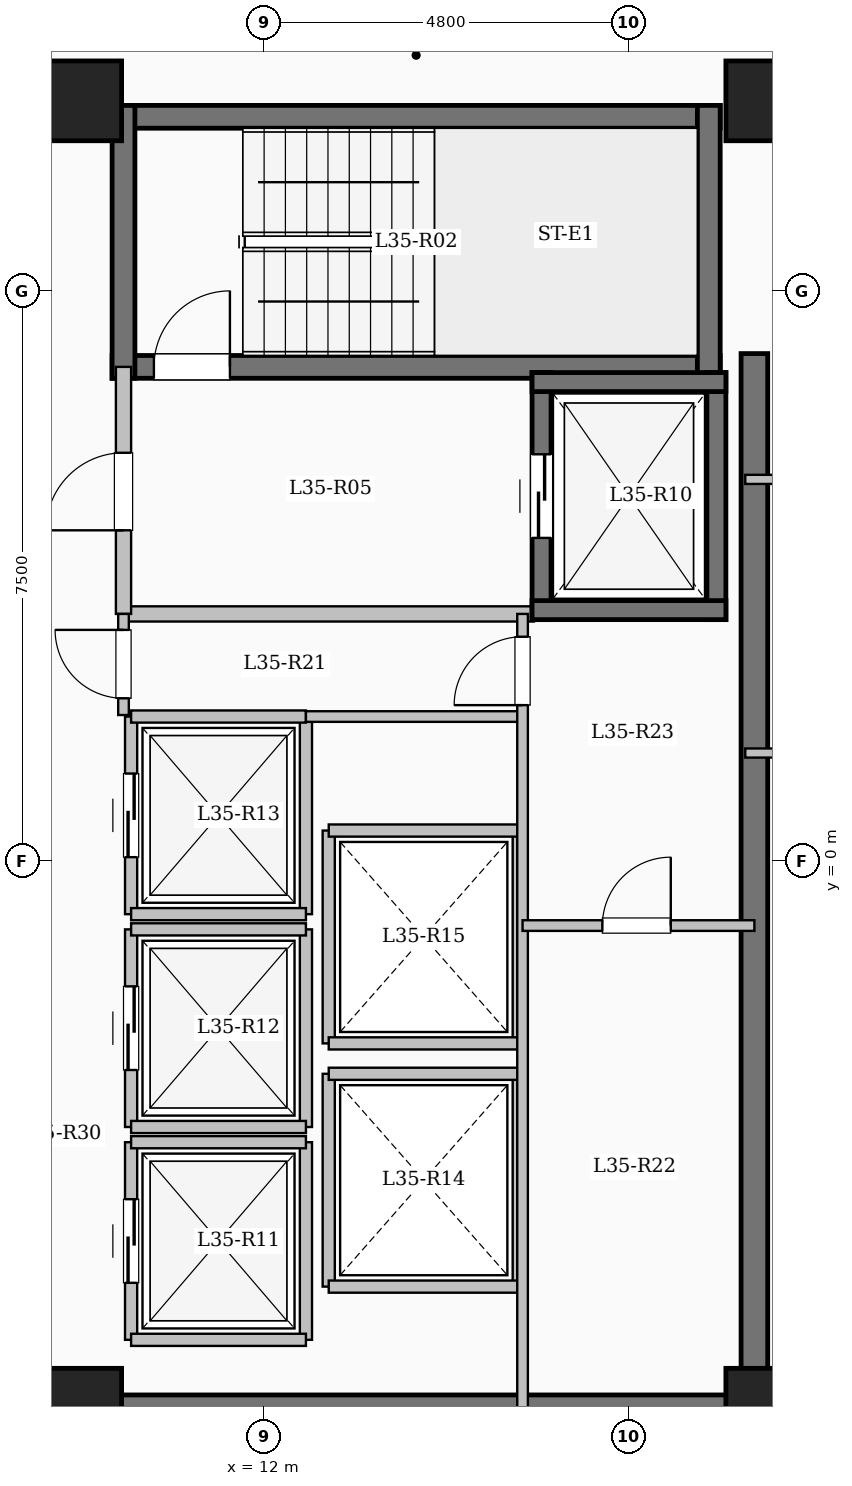
"""IFC4 building model, lengths in metres.
Left out: names, types, materials, properties, quantities, classifications, styles, units other than length and angle.
Written with IfcOpenShell. Run it as: python <this file> out.ifc"""

import sys

from ifc_helpers import new_model, si_unit, direction, frame, frame_2d, origin, origin_2d, place, context, subcontext, project, spatial, rectangle, extrude, element, fill, save


model = new_model("IFC4")
c1 = context("Model", 3, precision=1e-05, world=origin(), true_north=direction((0.0, 1.0)))
c2 = subcontext(c1, "Body", "Model", "MODEL_VIEW")
j1 = project(units=[si_unit("LENGTHUNIT", "METRE"), si_unit("PLANEANGLEUNIT", "RADIAN")], contexts=[c1])
p1 = place(None, origin())
s1 = spatial("IfcSite", under=j1, at=p1, CompositionType="ELEMENT")
p2 = place(p1, origin())
s2 = spatial("IfcBuilding", under=s1, at=p2, CompositionType="ELEMENT")
p3 = place(p2, frame((0.0, 0.0, 132.6)))
s3 = spatial("IfcBuildingStorey", under=s2, at=p3, CompositionType="ELEMENT", Elevation=132.6)
for number, where, z_axis, x_axis in (
    (1, (9.6, -7.2, 0.0), (0.0, 0.0, 1.0), (1.0, 0.0, 0.0)),
    (2, (9.6, 10.0, 0.0), (0.0, 0.0, 1.0), (1.0, 0.0, 0.0)),
    (3, (18.6, -7.2, 0.0), (0.0, 0.0, 1.0), (1.0, 0.0, 0.0)),
    (4, (18.6, 10.0, 0.0), (0.0, 0.0, 1.0), (1.0, 0.0, 0.0)),
):
    element("IfcColumn", number, at=place(p3, frame(where, z_axis=z_axis, x_axis=x_axis)), inside=s3, PredefinedType="COLUMN", context=c2, shape_type="SweptSolid", body=[
        extrude(rectangle(XDim=1.05, YDim=1.05, at=origin_2d()), origin(), (0.0, 0.0, 1.0), 3.35),
    ])
p4 = place(p3, frame((10.0, 9.79, 0.0), z_axis=(0.0, 0.0, 1.0), x_axis=(1.0, 0.0, 0.0)))
e5 = element("IfcWall", 5, at=p4, inside=s3, PredefinedType="SHEAR", context=c2, shape_type="SweptSolid", body=[
    extrude(rectangle(XDim=8.0, YDim=0.3, at=frame_2d((4.0, 0.0))), origin(), (0.0, 0.0, 1.0), 3.35),
])
p5 = place(p3, frame((10.0, 6.5, 0.0), z_axis=(0.0, 0.0, 1.0), x_axis=(1.0, 0.0, 0.0)))
e6 = element("IfcWall", 6, at=p5, inside=s3, PredefinedType="SHEAR", context=c2, shape_type="SweptSolid", body=[
    extrude(rectangle(XDim=8.0, YDim=0.3, at=frame_2d((4.0, 0.0))), origin(), (0.0, 0.0, 1.0), 3.35),
])
p6 = place(p5, frame((0.55, 0.0, 0.0)))
e7 = element("IfcOpeningElement", 7, at=p6, cuts=e6, PredefinedType="OPENING", context=c2, shape_type="SweptSolid", body=[
    extrude(rectangle(XDim=1.0, YDim=2.15, at=frame_2d((0.5, 1.075))), frame((0.0, 0.16, 0.0), z_axis=(0.0, -1.0, 0.0), x_axis=(1.0, 0.0, 0.0)), (0.0, 0.0, 1.0), 0.32),
])
for number, where, z_axis, x_axis in (
    (8, (10.15, 6.35, 0.0), (0.0, 0.0, 1.0), (0.0, 1.0, 0.0)),
    (9, (17.85, 6.35, 0.0), (0.0, 0.0, 1.0), (0.0, 1.0, 0.0)),
):
    element("IfcWall", number, at=place(p3, frame(where, z_axis=z_axis, x_axis=x_axis)), inside=s3, PredefinedType="SHEAR", context=c2, shape_type="SweptSolid", body=[
        extrude(rectangle(XDim=3.59, YDim=0.3, at=frame_2d((1.795, 0.0))), origin(), (0.0, 0.0, 1.0), 3.35),
    ])
p7 = place(p3, frame((10.15, 3.25, 0.0), z_axis=(0.0, 0.0, 1.0), x_axis=(1.0, 0.0, 0.0)))
e10 = element("IfcWall", 10, at=p7, inside=s3, PredefinedType="SOLIDWALL", context=c2, shape_type="SweptSolid", body=[
    extrude(rectangle(XDim=5.4, YDim=0.2, at=frame_2d((2.7, 0.0))), origin(), (0.0, 0.0, 1.0), 3.1),
])
p8 = place(p3, frame((10.15, 3.25, 0.0), z_axis=(0.0, 0.0, 1.0), x_axis=(0.0, 1.0, 0.0)))
e11 = element("IfcWall", 11, at=p8, inside=s3, PredefinedType="SOLIDWALL", context=c2, shape_type="SweptSolid", body=[
    extrude(rectangle(XDim=3.25, YDim=0.2, at=frame_2d((1.625, 0.0))), origin(), (0.0, 0.0, 1.0), 3.1),
])
p9 = place(p8, frame((1.1, 0.0, 0.0)))
e12 = element("IfcOpeningElement", 12, at=p9, cuts=e11, PredefinedType="OPENING", context=c2, shape_type="SweptSolid", body=[
    extrude(rectangle(XDim=1.02, YDim=2.15, at=frame_2d((0.51, 1.075))), frame((0.0, 0.11, 0.0), z_axis=(0.0, -1.0, 0.0), x_axis=(1.0, 0.0, 0.0)), (0.0, 0.0, 1.0), 0.22),
])
p10 = place(p3, frame((15.65, 3.175, 0.0), z_axis=(0.0, 0.0, 1.0), x_axis=(0.0, 1.0, 0.0)))
e13 = element("IfcWall", 13, at=p10, inside=s3, PredefinedType="SHEAR", context=c2, shape_type="SweptSolid", body=[
    extrude(rectangle(XDim=3.25, YDim=0.25, at=frame_2d((1.625, 0.0))), origin(), (0.0, 0.0, 1.0), 3.35),
])
p11 = place(p10, frame((1.075, 0.0, 0.0)))
e14 = element("IfcOpeningElement", 14, at=p11, cuts=e13, PredefinedType="OPENING", context=c2, shape_type="SweptSolid", body=[
    extrude(rectangle(XDim=1.1, YDim=2.15, at=frame_2d((0.55, 1.075))), frame((0.0, 0.135, 0.0), z_axis=(0.0, -1.0, 0.0), x_axis=(1.0, 0.0, 0.0)), (0.0, 0.0, 1.0), 0.27),
])
p12 = place(p3, frame((17.95, 3.175, 0.0), z_axis=(0.0, 0.0, 1.0), x_axis=(0.0, 1.0, 0.0)))
e15 = element("IfcWall", 15, at=p12, inside=s3, PredefinedType="SHEAR", context=c2, shape_type="SweptSolid", body=[
    extrude(rectangle(XDim=3.25, YDim=0.25, at=frame_2d((1.625, 0.0))), origin(), (0.0, 0.0, 1.0), 3.35),
])
for number, where, z_axis, x_axis in (
    (16, (15.525, 3.3, 0.0), (0.0, 0.0, 1.0), (1.0, 0.0, 0.0)),
    (17, (15.525, 6.3, 0.0), (0.0, 0.0, 1.0), (1.0, 0.0, 0.0)),
):
    element("IfcWall", number, at=place(p3, frame(where, z_axis=z_axis, x_axis=x_axis)), inside=s3, PredefinedType="SHEAR", context=c2, shape_type="SweptSolid", body=[
        extrude(rectangle(XDim=2.55, YDim=0.25, at=frame_2d((1.275, 0.0))), origin(), (0.0, 0.0, 1.0), 3.35),
    ])
p13 = place(p3, frame((10.25, -6.3, 0.0), z_axis=(0.0, 0.0, 1.0), x_axis=(0.0, 1.0, 0.0)))
e18 = element("IfcWall", 18, at=p13, inside=s3, PredefinedType="SOLIDWALL", context=c2, shape_type="SweptSolid", body=[
    extrude(rectangle(XDim=2.6, YDim=0.16, at=frame_2d((1.3, 0.0))), origin(), (0.0, 0.0, 1.0), 3.1),
])
p14 = place(p13, frame((0.75, 0.0, 0.0)))
e19 = element("IfcOpeningElement", 19, at=p14, cuts=e18, PredefinedType="OPENING", context=c2, shape_type="SweptSolid", body=[
    extrude(rectangle(XDim=1.1, YDim=2.15, at=frame_2d((0.55, 1.075))), frame((0.0, 0.09, 0.0), z_axis=(0.0, -1.0, 0.0), x_axis=(1.0, 0.0, 0.0)), (0.0, 0.0, 1.0), 0.18),
])
p15 = place(p3, frame((12.55, -6.3, 0.0), z_axis=(0.0, 0.0, 1.0), x_axis=(0.0, 1.0, 0.0)))
e20 = element("IfcWall", 20, at=p15, inside=s3, PredefinedType="SOLIDWALL", context=c2, shape_type="SweptSolid", body=[
    extrude(rectangle(XDim=2.6, YDim=0.16, at=frame_2d((1.3, 0.0))), origin(), (0.0, 0.0, 1.0), 3.1),
])
for number, where, z_axis, x_axis in (
    (21, (10.25, -6.3, 0.0), (0.0, 0.0, 1.0), (1.0, 0.0, 0.0)),
    (22, (10.25, -3.7, 0.0), (0.0, 0.0, 1.0), (1.0, 0.0, 0.0)),
):
    element("IfcWall", number, at=place(p3, frame(where, z_axis=z_axis, x_axis=x_axis)), inside=s3, PredefinedType="SOLIDWALL", context=c2, shape_type="SweptSolid", body=[
        extrude(rectangle(XDim=2.3, YDim=0.16, at=frame_2d((1.15, 0.0))), origin(), (0.0, 0.0, 1.0), 3.1),
    ])
p16 = place(p3, frame((10.25, -3.5, 0.0), z_axis=(0.0, 0.0, 1.0), x_axis=(0.0, 1.0, 0.0)))
e23 = element("IfcWall", 23, at=p16, inside=s3, PredefinedType="SOLIDWALL", context=c2, shape_type="SweptSolid", body=[
    extrude(rectangle(XDim=2.6, YDim=0.16, at=frame_2d((1.3, 0.0))), origin(), (0.0, 0.0, 1.0), 3.1),
])
p17 = place(p16, frame((0.75, 0.0, 0.0)))
e24 = element("IfcOpeningElement", 24, at=p17, cuts=e23, PredefinedType="OPENING", context=c2, shape_type="SweptSolid", body=[
    extrude(rectangle(XDim=1.1, YDim=2.15, at=frame_2d((0.55, 1.075))), frame((0.0, 0.09, 0.0), z_axis=(0.0, -1.0, 0.0), x_axis=(1.0, 0.0, 0.0)), (0.0, 0.0, 1.0), 0.18),
])
p18 = place(p3, frame((12.55, -3.5, 0.0), z_axis=(0.0, 0.0, 1.0), x_axis=(0.0, 1.0, 0.0)))
e25 = element("IfcWall", 25, at=p18, inside=s3, PredefinedType="SOLIDWALL", context=c2, shape_type="SweptSolid", body=[
    extrude(rectangle(XDim=2.6, YDim=0.16, at=frame_2d((1.3, 0.0))), origin(), (0.0, 0.0, 1.0), 3.1),
])
for number, where, z_axis, x_axis in (
    (26, (10.25, -3.5, 0.0), (0.0, 0.0, 1.0), (1.0, 0.0, 0.0)),
    (27, (10.25, -0.9, 0.0), (0.0, 0.0, 1.0), (1.0, 0.0, 0.0)),
):
    element("IfcWall", number, at=place(p3, frame(where, z_axis=z_axis, x_axis=x_axis)), inside=s3, PredefinedType="SOLIDWALL", context=c2, shape_type="SweptSolid", body=[
        extrude(rectangle(XDim=2.3, YDim=0.16, at=frame_2d((1.15, 0.0))), origin(), (0.0, 0.0, 1.0), 3.1),
    ])
p19 = place(p3, frame((10.25, -0.7, 0.0), z_axis=(0.0, 0.0, 1.0), x_axis=(0.0, 1.0, 0.0)))
e28 = element("IfcWall", 28, at=p19, inside=s3, PredefinedType="SOLIDWALL", context=c2, shape_type="SweptSolid", body=[
    extrude(rectangle(XDim=2.6, YDim=0.16, at=frame_2d((1.3, 0.0))), origin(), (0.0, 0.0, 1.0), 3.1),
])
p20 = place(p19, frame((0.75, 0.0, 0.0)))
e29 = element("IfcOpeningElement", 29, at=p20, cuts=e28, PredefinedType="OPENING", context=c2, shape_type="SweptSolid", body=[
    extrude(rectangle(XDim=1.1, YDim=2.15, at=frame_2d((0.55, 1.075))), frame((0.0, 0.09, 0.0), z_axis=(0.0, -1.0, 0.0), x_axis=(1.0, 0.0, 0.0)), (0.0, 0.0, 1.0), 0.18),
])
p21 = place(p3, frame((12.55, -0.7, 0.0), z_axis=(0.0, 0.0, 1.0), x_axis=(0.0, 1.0, 0.0)))
e30 = element("IfcWall", 30, at=p21, inside=s3, PredefinedType="SOLIDWALL", context=c2, shape_type="SweptSolid", body=[
    extrude(rectangle(XDim=2.6, YDim=0.16, at=frame_2d((1.3, 0.0))), origin(), (0.0, 0.0, 1.0), 3.1),
])
for number, where, z_axis, x_axis in (
    (31, (10.25, -0.7, 0.0), (0.0, 0.0, 1.0), (1.0, 0.0, 0.0)),
    (32, (10.25, 1.9, 0.0), (0.0, 0.0, 1.0), (1.0, 0.0, 0.0)),
):
    element("IfcWall", number, at=place(p3, frame(where, z_axis=z_axis, x_axis=x_axis)), inside=s3, PredefinedType="SOLIDWALL", context=c2, shape_type="SweptSolid", body=[
        extrude(rectangle(XDim=2.3, YDim=0.16, at=frame_2d((1.15, 0.0))), origin(), (0.0, 0.0, 1.0), 3.1),
    ])
for number, where, z_axis, x_axis in (
    (33, (12.85, -5.6, 0.0), (0.0, 0.0, 1.0), (0.0, 1.0, 0.0)),
    (34, (15.35, -5.6, 0.0), (0.0, 0.0, 1.0), (0.0, 1.0, 0.0)),
):
    element("IfcWall", number, at=place(p3, frame(where, z_axis=z_axis, x_axis=x_axis)), inside=s3, PredefinedType="SOLIDWALL", context=c2, shape_type="SweptSolid", body=[
        extrude(rectangle(XDim=2.8, YDim=0.16, at=frame_2d((1.4, 0.0))), origin(), (0.0, 0.0, 1.0), 3.1),
    ])
for number, where, z_axis, x_axis in (
    (35, (12.85, -5.6, 0.0), (0.0, 0.0, 1.0), (1.0, 0.0, 0.0)),
    (36, (12.85, -2.8, 0.0), (0.0, 0.0, 1.0), (1.0, 0.0, 0.0)),
):
    element("IfcWall", number, at=place(p3, frame(where, z_axis=z_axis, x_axis=x_axis)), inside=s3, PredefinedType="SOLIDWALL", context=c2, shape_type="SweptSolid", body=[
        extrude(rectangle(XDim=2.5, YDim=0.16, at=frame_2d((1.25, 0.0))), origin(), (0.0, 0.0, 1.0), 3.1),
    ])
for number, where, z_axis, x_axis in (
    (37, (12.85, -2.4, 0.0), (0.0, 0.0, 1.0), (0.0, 1.0, 0.0)),
    (38, (15.35, -2.4, 0.0), (0.0, 0.0, 1.0), (0.0, 1.0, 0.0)),
):
    element("IfcWall", number, at=place(p3, frame(where, z_axis=z_axis, x_axis=x_axis)), inside=s3, PredefinedType="SOLIDWALL", context=c2, shape_type="SweptSolid", body=[
        extrude(rectangle(XDim=2.8, YDim=0.16, at=frame_2d((1.4, 0.0))), origin(), (0.0, 0.0, 1.0), 3.1),
    ])
for number, where, z_axis, x_axis in (
    (39, (12.85, -2.4, 0.0), (0.0, 0.0, 1.0), (1.0, 0.0, 0.0)),
    (40, (12.85, 0.4, 0.0), (0.0, 0.0, 1.0), (1.0, 0.0, 0.0)),
):
    element("IfcWall", number, at=place(p3, frame(where, z_axis=z_axis, x_axis=x_axis)), inside=s3, PredefinedType="SOLIDWALL", context=c2, shape_type="SweptSolid", body=[
        extrude(rectangle(XDim=2.5, YDim=0.16, at=frame_2d((1.25, 0.0))), origin(), (0.0, 0.0, 1.0), 3.1),
    ])
p22 = place(p3, frame((18.45, -7.375, 0.0), z_axis=(0.0, 0.0, 1.0), x_axis=(0.0, 1.0, 0.0)))
e41 = element("IfcWall", 41, at=p22, inside=s3, PredefinedType="SHEAR", context=c2, shape_type="SweptSolid", body=[
    extrude(rectangle(XDim=14.05, YDim=0.35, at=frame_2d((7.025, 0.0))), origin(), (0.0, 0.0, 1.0), 3.35),
])
p23 = place(p3, frame((10.075, -7.2, 0.0), z_axis=(0.0, 0.0, 1.0), x_axis=(1.0, 0.0, 0.0)))
e42 = element("IfcWall", 42, at=p23, inside=s3, PredefinedType="SHEAR", context=c2, shape_type="SweptSolid", body=[
    extrude(rectangle(XDim=8.55, YDim=0.35, at=frame_2d((4.275, 0.0))), origin(), (0.0, 0.0, 1.0), 3.35),
])
p24 = place(p3, frame((12.55, 1.9, 0.0), z_axis=(0.0, 0.0, 1.0), x_axis=(1.0, 0.0, 0.0)))
e43 = element("IfcWall", 43, at=p24, inside=s3, PredefinedType="PARTITIONING", context=c2, shape_type="SweptSolid", body=[
    extrude(rectangle(XDim=2.85, YDim=0.14, at=frame_2d((1.425, 0.0))), origin(), (0.0, 0.0, 1.0), 3.1),
])
p25 = place(p3, frame((10.15, 1.92, 0.0), z_axis=(0.0, 0.0, 1.0), x_axis=(0.0, 1.0, 0.0)))
e44 = element("IfcWall", 44, at=p25, inside=s3, PredefinedType="PARTITIONING", context=c2, shape_type="SweptSolid", body=[
    extrude(rectangle(XDim=1.33, YDim=0.14, at=frame_2d((0.665, 0.0))), origin(), (0.0, 0.0, 1.0), 3.1),
])
p26 = place(p25, frame((0.22, 0.0, 0.0)))
e45 = element("IfcOpeningElement", 45, at=p26, cuts=e44, PredefinedType="OPENING", context=c2, shape_type="SweptSolid", body=[
    extrude(rectangle(XDim=0.9, YDim=2.08, at=frame_2d((0.45, 1.04))), frame((0.0, 0.08, 0.0), z_axis=(0.0, -1.0, 0.0), x_axis=(1.0, 0.0, 0.0)), (0.0, 0.0, 1.0), 0.16),
])
p27 = place(p3, frame((15.4, -7.2, 0.0), z_axis=(0.0, 0.0, 1.0), x_axis=(0.0, 1.0, 0.0)))
e46 = element("IfcWall", 46, at=p27, inside=s3, PredefinedType="PARTITIONING", context=c2, shape_type="SweptSolid", body=[
    extrude(rectangle(XDim=10.45, YDim=0.14, at=frame_2d((5.225, 0.0))), origin(), (0.0, 0.0, 1.0), 3.1),
])
p28 = place(p27, frame((9.25, 0.0, 0.0)))
e47 = element("IfcOpeningElement", 47, at=p28, cuts=e46, PredefinedType="OPENING", context=c2, shape_type="SweptSolid", body=[
    extrude(rectangle(XDim=0.9, YDim=2.08, at=frame_2d((0.45, 1.04))), frame((0.0, 0.08, 0.0), z_axis=(0.0, -1.0, 0.0), x_axis=(1.0, 0.0, 0.0)), (0.0, 0.0, 1.0), 0.16),
])
p29 = place(p3, frame((15.4, -0.85, 0.0), z_axis=(0.0, 0.0, 1.0), x_axis=(1.0, 0.0, 0.0)))
e48 = element("IfcWall", 48, at=p29, inside=s3, PredefinedType="PARTITIONING", context=c2, shape_type="SweptSolid", body=[
    extrude(rectangle(XDim=3.05, YDim=0.14, at=frame_2d((1.525, 0.0))), origin(), (0.0, 0.0, 1.0), 3.1),
])
p30 = place(p29, frame((1.05, 0.0, 0.0)))
e49 = element("IfcOpeningElement", 49, at=p30, cuts=e48, PredefinedType="OPENING", context=c2, shape_type="SweptSolid", body=[
    extrude(rectangle(XDim=0.9, YDim=2.08, at=frame_2d((0.45, 1.04))), frame((0.0, 0.08, 0.0), z_axis=(0.0, -1.0, 0.0), x_axis=(1.0, 0.0, 0.0)), (0.0, 0.0, 1.0), 0.16),
])
p31 = place(p3, frame((18.45, -7.25, 0.0), z_axis=(0.0, 0.0, 1.0), x_axis=(1.0, 0.0, 0.0)))
e50 = element("IfcWall", 50, at=p31, inside=s3, PredefinedType="PARTITIONING", context=c2, shape_type="SweptSolid", body=[
    extrude(rectangle(XDim=6.63, YDim=0.15, at=frame_2d((3.315, 0.0))), origin(), (0.0, 0.0, 1.0), 3.1),
])
p32 = place(p31, frame((1.95, 0.0, 0.0)))
e51 = element("IfcOpeningElement", 51, at=p32, cuts=e50, PredefinedType="OPENING", context=c2, shape_type="SweptSolid", body=[
    extrude(rectangle(XDim=0.96, YDim=2.15, at=frame_2d((0.48, 1.075))), frame((0.0, 0.085, 0.0), z_axis=(0.0, -1.0, 0.0), x_axis=(1.0, 0.0, 0.0)), (0.0, 0.0, 1.0), 0.17),
])
p33 = place(p3, frame((18.33, 1.42, 0.0), z_axis=(0.0, 0.0, 1.0), x_axis=(1.0, 0.0, 0.0)))
e52 = element("IfcWall", 52, at=p33, inside=s3, PredefinedType="PARTITIONING", context=c2, shape_type="SweptSolid", body=[
    extrude(rectangle(XDim=6.87, YDim=0.12, at=frame_2d((3.435, 0.0))), origin(), (0.0, 0.0, 1.0), 3.1),
])
p34 = place(p33, frame((1.413, 0.0, 0.0)))
e53 = element("IfcOpeningElement", 53, at=p34, cuts=e52, PredefinedType="OPENING", context=c2, shape_type="SweptSolid", body=[
    extrude(rectangle(XDim=0.88, YDim=2.1, at=frame_2d((0.44, 1.05))), frame((0.0, 0.07, 0.0), z_axis=(0.0, -1.0, 0.0), x_axis=(1.0, 0.0, 0.0)), (0.0, 0.0, 1.0), 0.14),
])
p35 = place(p33, frame((4.678, 0.0, 0.0)))
e54 = element("IfcOpeningElement", 54, at=p35, cuts=e52, PredefinedType="OPENING", context=c2, shape_type="SweptSolid", body=[
    extrude(rectangle(XDim=0.88, YDim=2.1, at=frame_2d((0.44, 1.05))), frame((0.0, 0.07, 0.0), z_axis=(0.0, -1.0, 0.0), x_axis=(1.0, 0.0, 0.0)), (0.0, 0.0, 1.0), 0.14),
])
p36 = place(p3, frame((18.33, 5.02, 0.0), z_axis=(0.0, 0.0, 1.0), x_axis=(1.0, 0.0, 0.0)))
e55 = element("IfcWall", 55, at=p36, inside=s3, PredefinedType="PARTITIONING", context=c2, shape_type="SweptSolid", body=[
    extrude(rectangle(XDim=6.87, YDim=0.12, at=frame_2d((3.435, 0.0))), origin(), (0.0, 0.0, 1.0), 3.1),
])
p37 = place(p36, frame((0.77, 0.0, 0.0)))
e56 = element("IfcOpeningElement", 56, at=p37, cuts=e55, PredefinedType="OPENING", context=c2, shape_type="SweptSolid", body=[
    extrude(rectangle(XDim=0.88, YDim=2.1, at=frame_2d((0.44, 1.05))), frame((0.0, 0.07, 0.0), z_axis=(0.0, -1.0, 0.0), x_axis=(1.0, 0.0, 0.0)), (0.0, 0.0, 1.0), 0.14),
])
p38 = place(p6, origin())
e57 = element("IfcDoor", 57, at=p38, inside=s3, OperationType="SINGLE_SWING_RIGHT", PredefinedType="DOOR", context=c2, shape_type="SweptSolid", body=[
    extrude(rectangle(XDim=1.0, YDim=2.15, at=frame_2d((0.5, 1.075))), frame((0.0, 0.025, 0.0), z_axis=(0.0, -1.0, 0.0), x_axis=(1.0, 0.0, 0.0)), (0.0, 0.0, 1.0), 0.05),
])
fill(e7, e57)
p39 = place(p9, origin())
e58 = element("IfcDoor", 58, at=p39, inside=s3, OperationType="SINGLE_SWING_LEFT", PredefinedType="DOOR", context=c2, shape_type="SweptSolid", body=[
    extrude(rectangle(XDim=1.02, YDim=2.15, at=frame_2d((0.51, 1.075))), frame((0.0, 0.025, 0.0), z_axis=(0.0, -1.0, 0.0), x_axis=(1.0, 0.0, 0.0)), (0.0, 0.0, 1.0), 0.05),
])
fill(e12, e58)
p40 = place(p11, origin())
e59 = element("IfcDoor", 59, at=p40, inside=s3, OperationType="SLIDING_TO_LEFT", PredefinedType="DOOR", context=c2, shape_type="SweptSolid", body=[
    extrude(rectangle(XDim=1.1, YDim=2.15, at=frame_2d((0.55, 1.075))), frame((0.0, 0.025, 0.0), z_axis=(0.0, -1.0, 0.0), x_axis=(1.0, 0.0, 0.0)), (0.0, 0.0, 1.0), 0.05),
])
fill(e14, e59)
p41 = place(p14, origin())
e60 = element("IfcDoor", 60, at=p41, inside=s3, OperationType="SLIDING_TO_LEFT", PredefinedType="DOOR", context=c2, shape_type="SweptSolid", body=[
    extrude(rectangle(XDim=1.1, YDim=2.15, at=frame_2d((0.55, 1.075))), frame((0.0, 0.025, 0.0), z_axis=(0.0, -1.0, 0.0), x_axis=(1.0, 0.0, 0.0)), (0.0, 0.0, 1.0), 0.05),
])
fill(e19, e60)
p42 = place(p17, origin())
e61 = element("IfcDoor", 61, at=p42, inside=s3, OperationType="SLIDING_TO_LEFT", PredefinedType="DOOR", context=c2, shape_type="SweptSolid", body=[
    extrude(rectangle(XDim=1.1, YDim=2.15, at=frame_2d((0.55, 1.075))), frame((0.0, 0.025, 0.0), z_axis=(0.0, -1.0, 0.0), x_axis=(1.0, 0.0, 0.0)), (0.0, 0.0, 1.0), 0.05),
])
fill(e24, e61)
p43 = place(p20, origin())
e62 = element("IfcDoor", 62, at=p43, inside=s3, OperationType="SLIDING_TO_LEFT", PredefinedType="DOOR", context=c2, shape_type="SweptSolid", body=[
    extrude(rectangle(XDim=1.1, YDim=2.15, at=frame_2d((0.55, 1.075))), frame((0.0, 0.025, 0.0), z_axis=(0.0, -1.0, 0.0), x_axis=(1.0, 0.0, 0.0)), (0.0, 0.0, 1.0), 0.05),
])
fill(e29, e62)
p44 = place(p26, origin())
e63 = element("IfcDoor", 63, at=p44, inside=s3, OperationType="SINGLE_SWING_RIGHT", PredefinedType="DOOR", context=c2, shape_type="SweptSolid", body=[
    extrude(rectangle(XDim=0.9, YDim=2.08, at=frame_2d((0.45, 1.04))), frame((0.0, 0.025, 0.0), z_axis=(0.0, -1.0, 0.0), x_axis=(1.0, 0.0, 0.0)), (0.0, 0.0, 1.0), 0.05),
])
fill(e45, e63)
p45 = place(p28, origin())
e64 = element("IfcDoor", 64, at=p45, inside=s3, OperationType="SINGLE_SWING_LEFT", PredefinedType="DOOR", context=c2, shape_type="SweptSolid", body=[
    extrude(rectangle(XDim=0.9, YDim=2.08, at=frame_2d((0.45, 1.04))), frame((0.0, 0.025, 0.0), z_axis=(0.0, -1.0, 0.0), x_axis=(1.0, 0.0, 0.0)), (0.0, 0.0, 1.0), 0.05),
])
fill(e47, e64)
p46 = place(p30, origin())
e65 = element("IfcDoor", 65, at=p46, inside=s3, OperationType="SINGLE_SWING_RIGHT", PredefinedType="DOOR", context=c2, shape_type="SweptSolid", body=[
    extrude(rectangle(XDim=0.9, YDim=2.08, at=frame_2d((0.45, 1.04))), frame((0.0, 0.025, 0.0), z_axis=(0.0, -1.0, 0.0), x_axis=(1.0, 0.0, 0.0)), (0.0, 0.0, 1.0), 0.05),
])
fill(e49, e65)
save(model, sys.argv[1])
